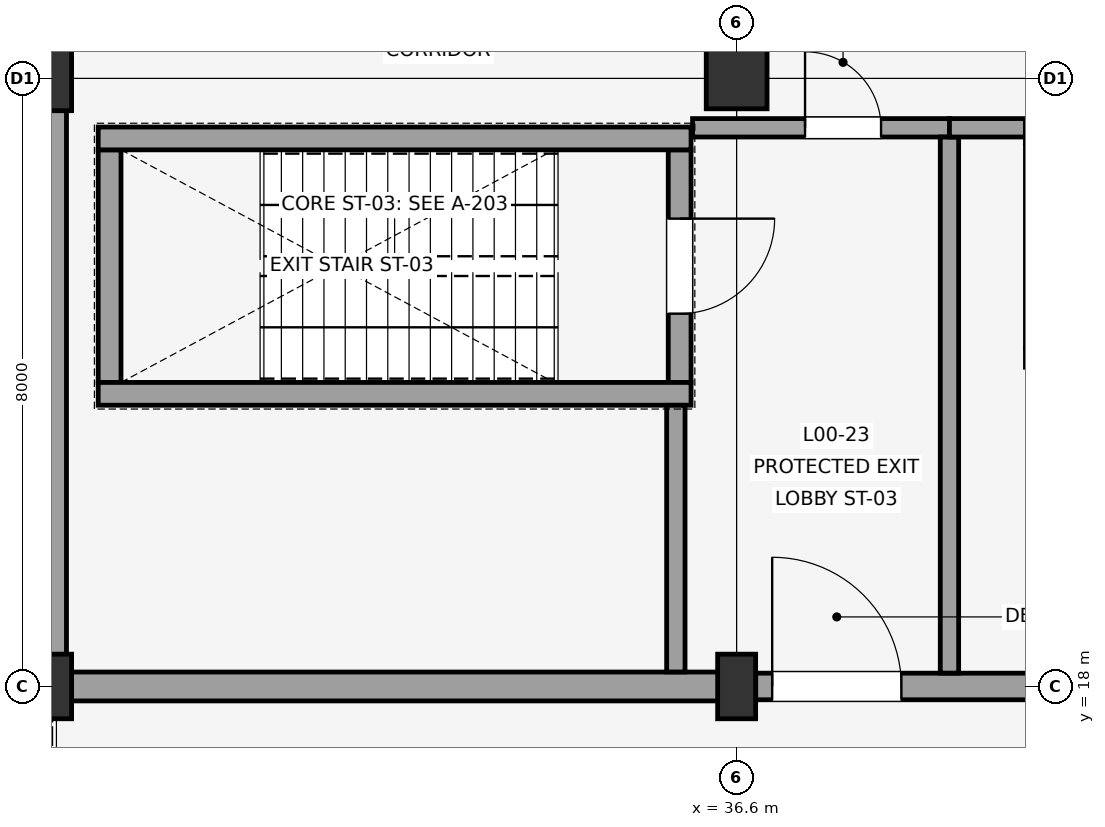
"""IFC4 building model, lengths in metres.
Left out: names, types, materials, properties, quantities, classifications, styles, units other than length and angle.
Written with IfcOpenShell. Run it as: python <this file> out.ifc"""

import sys

from ifc_helpers import new_model, si_unit, direction, frame, frame_2d, origin, origin_2d, place, context, subcontext, project, spatial, rectangle, extrude, element, fill, save


model = new_model("IFC4")
c1 = context("Model", 3, precision=1e-05, world=origin(), true_north=direction((0.0, 1.0)))
c2 = subcontext(c1, "Body", "Model", "MODEL_VIEW")
j1 = project(units=[si_unit("LENGTHUNIT", "METRE"), si_unit("PLANEANGLEUNIT", "RADIAN")], contexts=[c1])
p1 = place(None, origin())
s1 = spatial("IfcSite", under=j1, at=p1, CompositionType="ELEMENT")
p2 = place(p1, origin())
s2 = spatial("IfcBuilding", under=s1, at=p2, CompositionType="ELEMENT")
p3 = place(p2, origin())
s3 = spatial("IfcBuildingStorey", under=s2, at=p3, CompositionType="ELEMENT", Elevation=0.0)
for number, where, z_axis, x_axis in (
    (1, (27.6, 18.0, 0.0), (0.0, 0.0, 1.0), (1.0, 0.0, 0.0)),
    (2, (27.6, 26.0, 0.0), (0.0, 0.0, 1.0), (1.0, 0.0, 0.0)),
    (3, (36.6, 18.0, 0.0), (0.0, 0.0, 1.0), (1.0, 0.0, 0.0)),
):
    element("IfcColumn", number, at=place(p3, frame(where, z_axis=z_axis, x_axis=x_axis)), inside=s3, PredefinedType="COLUMN", context=c2, shape_type="SweptSolid", body=[
        extrude(rectangle(XDim=0.5, YDim=0.85, at=origin_2d()), origin(), (0.0, 0.0, 1.0), 4.5),
    ])
p4 = place(p3, frame((36.6, 26.0, 0.0), z_axis=(0.0, 0.0, 1.0), x_axis=(1.0, 0.0, 0.0)))
e4 = element("IfcColumn", 4, at=p4, inside=s3, PredefinedType="COLUMN", context=c2, shape_type="SweptSolid", body=[
    extrude(rectangle(XDim=0.8, YDim=0.8, at=origin_2d()), origin(), (0.0, 0.0, 1.0), 4.5),
])
p5 = place(p3, frame((27.35, 18.0, 0.0), z_axis=(0.0, 0.0, 1.0), x_axis=(1.0, 0.0, 0.0)))
e5 = element("IfcWall", 5, at=p5, inside=s3, PredefinedType="SOLIDWALL", context=c2, shape_type="SweptSolid", body=[
    extrude(rectangle(XDim=9.5, YDim=0.38, at=frame_2d((4.75, 0.0))), origin(), (0.0, 0.0, 1.0), 3.12),
])
p6 = place(p3, frame((36.851, 18.0, 0.0), z_axis=(0.0, 0.0, 1.0), x_axis=(1.0, 0.0, 0.0)))
e6 = element("IfcWall", 6, at=p6, inside=s3, PredefinedType="SOLIDWALL", context=c2, shape_type="SweptSolid", body=[
    extrude(rectangle(XDim=8.999, YDim=0.35, at=frame_2d((4.5, 0.0))), origin(), (0.0, 0.0, 1.0), 3.12),
])
p7 = place(p6, frame((0.217, 0.0, 0.0)))
e7 = element("IfcOpeningElement", 7, at=p7, cuts=e6, PredefinedType="OPENING", context=c2, shape_type="SweptSolid", body=[
    extrude(rectangle(XDim=1.7, YDim=2.35, at=frame_2d((0.85, 1.175))), frame((0.0, 0.185, 0.0), z_axis=(0.0, -1.0, 0.0), x_axis=(1.0, 0.0, 0.0)), (0.0, 0.0, 1.0), 0.37),
])
p8 = place(p3, frame((27.6, 26.425, 0.0), z_axis=(0.0, 0.0, 1.0), x_axis=(0.0, -1.0, 0.0)))
e8 = element("IfcWall", 8, at=p8, inside=s3, PredefinedType="SOLIDWALL", context=c2, shape_type="SweptSolid", body=[
    extrude(rectangle(XDim=8.234, YDim=0.365, at=frame_2d((4.117, 0.0))), origin(), (0.0, 0.0, 1.0), 3.12),
])
p9 = place(p3, frame((35.85, 25.06, 0.0), z_axis=(0.0, 0.0, 1.0), x_axis=(0.0, -1.0, 0.0)))
e9 = element("IfcWall", 9, at=p9, inside=s3, PredefinedType="SHEAR", context=c2, shape_type="SweptSolid", body=[
    extrude(rectangle(XDim=3.06, YDim=0.3, at=frame_2d((1.53, 0.0))), origin(), (0.0, 0.0, 1.0), 4.5),
])
p10 = place(p9, frame((0.905, 0.0, 0.0)))
e10 = element("IfcOpeningElement", 10, at=p10, cuts=e9, PredefinedType="OPENING", context=c2, shape_type="SweptSolid", body=[
    extrude(rectangle(XDim=1.25, YDim=2.15, at=frame_2d((0.625, 1.075))), frame((0.0, 0.16, 0.0), z_axis=(0.0, -1.0, 0.0), x_axis=(1.0, 0.0, 0.0)), (0.0, 0.0, 1.0), 0.32),
])
p11 = place(p3, frame((28.35, 25.06, 0.0), z_axis=(0.0, 0.0, 1.0), x_axis=(0.0, -1.0, 0.0)))
e11 = element("IfcWall", 11, at=p11, inside=s3, PredefinedType="SHEAR", context=c2, shape_type="SweptSolid", body=[
    extrude(rectangle(XDim=3.06, YDim=0.3, at=frame_2d((1.53, 0.0))), origin(), (0.0, 0.0, 1.0), 4.5),
])
for number, where, z_axis, x_axis in (
    (12, (36.0, 25.21, 0.0), (0.0, 0.0, 1.0), (-1.0, 0.0, 0.0)),
    (13, (36.0, 21.85, 0.0), (0.0, 0.0, 1.0), (-1.0, 0.0, 0.0)),
):
    element("IfcWall", number, at=place(p3, frame(where, z_axis=z_axis, x_axis=x_axis)), inside=s3, PredefinedType="SHEAR", context=c2, shape_type="SweptSolid", body=[
        extrude(rectangle(XDim=7.8, YDim=0.3, at=frame_2d((3.9, 0.0))), origin(), (0.0, 0.0, 1.0), 4.5),
    ])
p12 = place(p3, frame((36.02, 25.35, 0.0), z_axis=(0.0, 0.0, 1.0), x_axis=(1.0, 0.0, 0.0)))
e14 = element("IfcWall", 14, at=p12, inside=s3, PredefinedType="SOLIDWALL", context=c2, shape_type="SweptSolid", body=[
    extrude(rectangle(XDim=3.38, YDim=0.242, at=frame_2d((1.69, 0.0))), origin(), (0.0, 0.0, 1.0), 2.7),
])
p13 = place(p12, frame((1.48, 0.0, 0.0)))
e15 = element("IfcOpeningElement", 15, at=p13, cuts=e14, PredefinedType="OPENING", context=c2, shape_type="SweptSolid", body=[
    extrude(rectangle(XDim=1.0, YDim=2.15, at=frame_2d((0.5, 1.075))), frame((0.0, 0.131, 0.0), z_axis=(0.0, -1.0, 0.0), x_axis=(1.0, 0.0, 0.0)), (0.0, 0.0, 1.0), 0.262),
])
p14 = place(p3, frame((39.4, 25.228, 0.0), z_axis=(0.0, 0.0, 1.0), x_axis=(0.0, -1.0, 0.0)))
e16 = element("IfcWall", 16, at=p14, inside=s3, PredefinedType="SOLIDWALL", context=c2, shape_type="SweptSolid", body=[
    extrude(rectangle(XDim=7.052, YDim=0.242, at=frame_2d((3.526, 0.0))), origin(), (0.0, 0.0, 1.0), 2.7),
])
p15 = place(p3, frame((35.8, 18.191, 0.0), z_axis=(0.0, 0.0, 1.0), x_axis=(0.0, 1.0, 0.0)))
e17 = element("IfcWall", 17, at=p15, inside=s3, PredefinedType="SOLIDWALL", context=c2, shape_type="SweptSolid", body=[
    extrude(rectangle(XDim=3.508, YDim=0.242, at=frame_2d((1.754, 0.0))), origin(), (0.0, 0.0, 1.0), 2.7),
])
p16 = place(p3, frame((39.4, 25.35, 0.0), z_axis=(0.0, 0.0, 1.0), x_axis=(1.0, 0.0, 0.0)))
e18 = element("IfcWall", 18, at=p16, inside=s3, PredefinedType="SOLIDWALL", context=c2, shape_type="SweptSolid", body=[
    extrude(rectangle(XDim=0.999, YDim=0.242, at=frame_2d((0.5, 0.0))), origin(), (0.0, 0.0, 1.0), 2.7),
])
p17 = place(p7, origin())
e19 = element("IfcDoor", 19, at=p17, inside=s3, OperationType="DOUBLE_SWING_LEFT", PredefinedType="DOOR", context=c2, shape_type="SweptSolid", body=[
    extrude(rectangle(XDim=1.7, YDim=2.35, at=frame_2d((0.85, 1.175))), frame((0.0, 0.025, 0.0), z_axis=(0.0, -1.0, 0.0), x_axis=(1.0, 0.0, 0.0)), (0.0, 0.0, 1.0), 0.05),
])
fill(e7, e19)
p18 = place(p10, origin())
e20 = element("IfcDoor", 20, at=p18, inside=s3, OperationType="SINGLE_SWING_LEFT", PredefinedType="DOOR", context=c2, shape_type="SweptSolid", body=[
    extrude(rectangle(XDim=1.25, YDim=2.15, at=frame_2d((0.625, 1.075))), frame((0.0, 0.025, 0.0), z_axis=(0.0, -1.0, 0.0), x_axis=(1.0, 0.0, 0.0)), (0.0, 0.0, 1.0), 0.05),
])
fill(e10, e20)
p19 = place(p13, origin())
e21 = element("IfcDoor", 21, at=p19, inside=s3, OperationType="SINGLE_SWING_LEFT", PredefinedType="DOOR", context=c2, shape_type="SweptSolid", body=[
    extrude(rectangle(XDim=1.0, YDim=2.15, at=frame_2d((0.5, 1.075))), frame((0.0, 0.025, 0.0), z_axis=(0.0, -1.0, 0.0), x_axis=(1.0, 0.0, 0.0)), (0.0, 0.0, 1.0), 0.05),
])
fill(e15, e21)
save(model, sys.argv[1])
